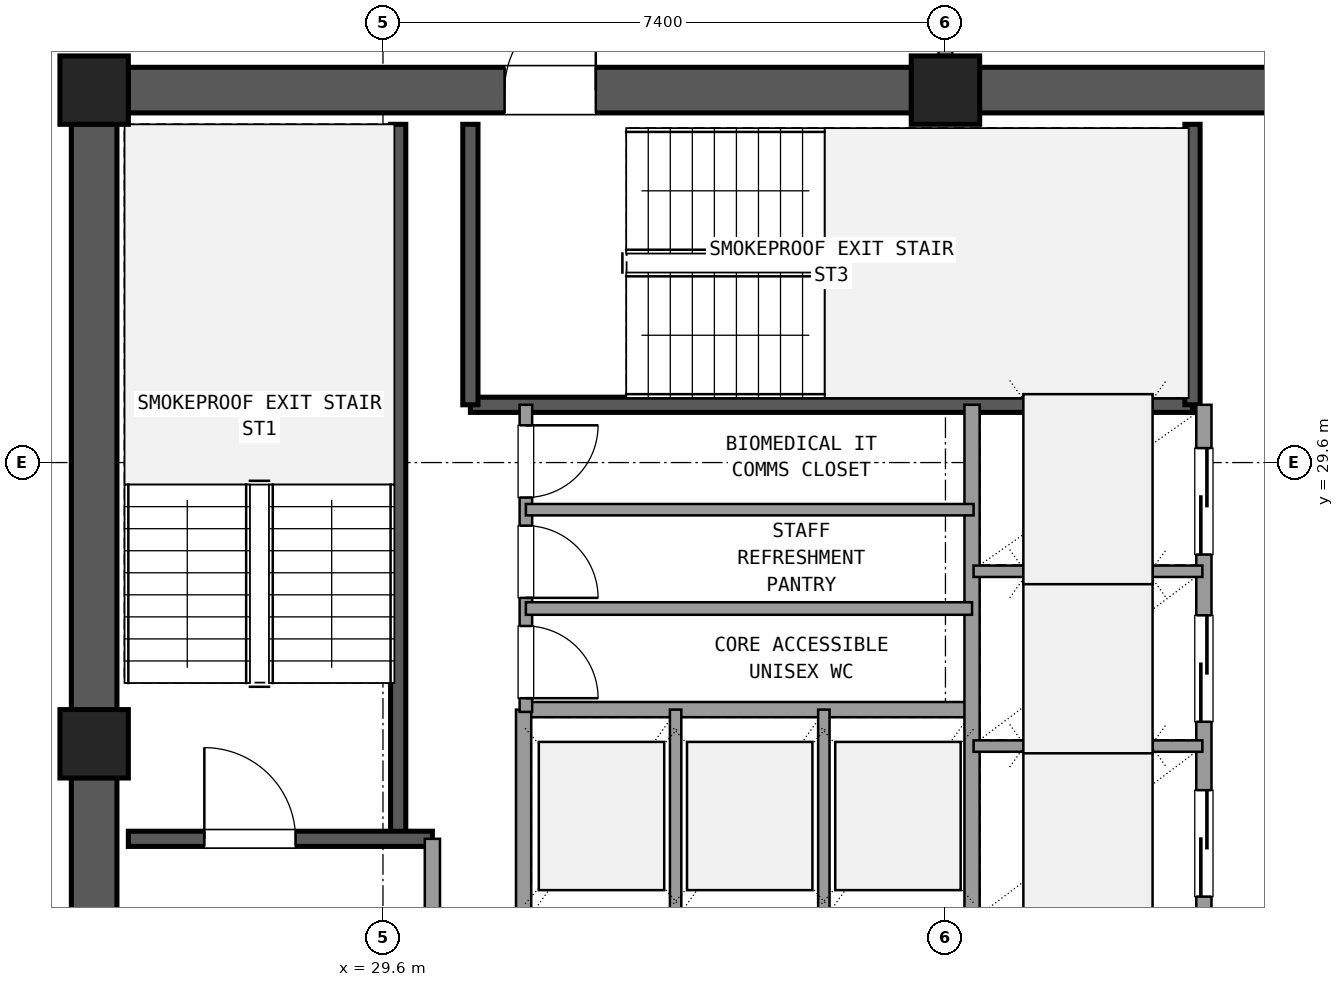
"""IFC4 building model, lengths in metres.
Left out: names, types, materials, properties, quantities, classifications, styles, units other than length and angle.
Written with IfcOpenShell. Run it as: python <this file> out.ifc"""

import sys

from ifc_helpers import new_model, si_unit, direction, frame, frame_2d, origin, origin_2d, place, context, subcontext, project, spatial, rectangle, extrude, element, fill, save


model = new_model("IFC4")
c1 = context("Model", 3, precision=1e-05, world=origin(), true_north=direction((0.0, 1.0)))
c2 = subcontext(c1, "Body", "Model", "MODEL_VIEW")
j1 = project(units=[si_unit("LENGTHUNIT", "METRE"), si_unit("PLANEANGLEUNIT", "RADIAN")], contexts=[c1])
p1 = place(None, origin())
s1 = spatial("IfcSite", under=j1, at=p1, CompositionType="ELEMENT")
p2 = place(p1, origin())
s2 = spatial("IfcBuilding", under=s1, at=p2, CompositionType="ELEMENT")
p3 = place(p2, frame((0.0, 0.0, 210.78)))
s3 = spatial("IfcBuildingStorey", under=s2, at=p3, CompositionType="ELEMENT", Elevation=210.78)
for number, where, z_axis, x_axis in (
    (1, (37.0, 34.5, 0.0), (0.0, 0.0, 1.0), (1.0, 0.0, 0.0)),
    (2, (25.8, 34.5, 0.0), (0.0, 0.0, 1.0), (1.0, 0.0, 0.0)),
    (3, (25.8, 25.9, 0.0), (0.0, 0.0, 1.0), (1.0, 0.0, 0.0)),
):
    element("IfcColumn", number, at=place(p3, frame(where, z_axis=z_axis, x_axis=x_axis)), inside=s3, PredefinedType="COLUMN", context=c2, shape_type="SweptSolid", body=[
        extrude(rectangle(XDim=0.9, YDim=0.9, at=origin_2d()), origin(), (0.0, 0.0, 1.0), 3.6),
    ])
p4 = place(p3, frame((47.755, 34.5, 0.0), z_axis=(0.0, 0.0, 1.0), x_axis=(-1.0, 0.0, 0.0)))
e4 = element("IfcWall", 4, at=p4, inside=s3, PredefinedType="SHEAR", context=c2, shape_type="SweptSolid", body=[
    extrude(rectangle(XDim=10.31, YDim=0.6, at=frame_2d((5.155, 0.0))), origin(), (0.0, 0.0, 1.0), 3.32),
])
p5 = place(p4, frame((4.655, 0.0, 0.0)))
e5 = element("IfcOpeningElement", 5, at=p5, cuts=e4, PredefinedType="OPENING", context=c2, shape_type="SweptSolid", body=[
    extrude(rectangle(XDim=1.6, YDim=2.2, at=frame_2d((0.8, 1.1))), frame((0.0, 0.31, 0.0), z_axis=(0.0, -1.0, 0.0), x_axis=(1.0, 0.0, 0.0)), (0.0, 0.0, 1.0), 0.62),
])
p6 = place(p3, frame((36.555, 34.5, 0.0), z_axis=(0.0, 0.0, 1.0), x_axis=(-1.0, 0.0, 0.0)))
e6 = element("IfcWall", 6, at=p6, inside=s3, PredefinedType="SHEAR", context=c2, shape_type="SweptSolid", body=[
    extrude(rectangle(XDim=10.31, YDim=0.6, at=frame_2d((5.155, 0.0))), origin(), (0.0, 0.0, 1.0), 3.32),
])
p7 = place(p6, frame((4.155, 0.0, 0.0)))
e7 = element("IfcOpeningElement", 7, at=p7, cuts=e6, PredefinedType="OPENING", context=c2, shape_type="SweptSolid", body=[
    extrude(rectangle(XDim=1.2, YDim=2.15, at=frame_2d((0.6, 1.075))), frame((0.0, 0.31, 0.0), z_axis=(0.0, -1.0, 0.0), x_axis=(1.0, 0.0, 0.0)), (0.0, 0.0, 1.0), 0.62),
])
p8 = place(p3, frame((25.8, 34.055, 0.0), z_axis=(0.0, 0.0, 1.0), x_axis=(0.0, -1.0, 0.0)))
e8 = element("IfcWall", 8, at=p8, inside=s3, PredefinedType="SHEAR", context=c2, shape_type="SweptSolid", body=[
    extrude(rectangle(XDim=7.71, YDim=0.6, at=frame_2d((3.855, 0.0))), origin(), (0.0, 0.0, 1.0), 3.32),
])
p9 = place(p3, frame((25.8, 25.455, 0.0), z_axis=(0.0, 0.0, 1.0), x_axis=(0.0, -1.0, 0.0)))
e9 = element("IfcWall", 9, at=p9, inside=s3, PredefinedType="SHEAR", context=c2, shape_type="SweptSolid", body=[
    extrude(rectangle(XDim=7.71, YDim=0.6, at=frame_2d((3.855, 0.0))), origin(), (0.0, 0.0, 1.0), 3.32),
])
p10 = place(p9, frame((2.205, 0.0, 0.0)))
e10 = element("IfcOpeningElement", 10, at=p10, cuts=e9, PredefinedType="OPENING", context=c2, shape_type="SweptSolid", body=[
    extrude(rectangle(XDim=1.2, YDim=2.15, at=frame_2d((0.6, 1.075))), frame((0.0, 0.31, 0.0), z_axis=(0.0, -1.0, 0.0), x_axis=(1.0, 0.0, 0.0)), (0.0, 0.0, 1.0), 0.62),
])
p11 = place(p3, frame((29.8, 24.65, 0.0), z_axis=(0.0, 0.0, 1.0), x_axis=(0.0, 1.0, 0.0)))
e11 = element("IfcWall", 11, at=p11, inside=s3, PredefinedType="SHEAR", context=c2, shape_type="SweptSolid", body=[
    extrude(rectangle(XDim=9.4, YDim=0.2, at=frame_2d((4.7, 0.0))), origin(), (0.0, 0.0, 1.0), 3.32),
])
p12 = place(p3, frame((26.25, 24.65, 0.0), z_axis=(0.0, 0.0, 1.0), x_axis=(1.0, 0.0, 0.0)))
e12 = element("IfcWall", 12, at=p12, inside=s3, PredefinedType="SHEAR", context=c2, shape_type="SweptSolid", body=[
    extrude(rectangle(XDim=4.0, YDim=0.2, at=frame_2d((2.0, 0.0))), origin(), (0.0, 0.0, 1.0), 3.32),
])
p13 = place(p12, frame((1.0, 0.0, 0.0)))
e13 = element("IfcOpeningElement", 13, at=p13, cuts=e12, PredefinedType="OPENING", context=c2, shape_type="SweptSolid", body=[
    extrude(rectangle(XDim=1.2, YDim=2.15, at=frame_2d((0.6, 1.075))), frame((0.0, 0.11, 0.0), z_axis=(0.0, -1.0, 0.0), x_axis=(1.0, 0.0, 0.0)), (0.0, 0.0, 1.0), 0.22),
])
p14 = place(p3, frame((30.75, 30.36, 0.0), z_axis=(0.0, 0.0, 1.0), x_axis=(1.0, 0.0, 0.0)))
e14 = element("IfcWall", 14, at=p14, inside=s3, PredefinedType="SHEAR", context=c2, shape_type="SweptSolid", body=[
    extrude(rectangle(XDim=9.5, YDim=0.2, at=frame_2d((4.75, 0.0))), origin(), (0.0, 0.0, 1.0), 3.32),
])
for number, where, z_axis, x_axis in (
    (15, (30.75, 30.36, 0.0), (0.0, 0.0, 1.0), (0.0, 1.0, 0.0)),
    (16, (40.25, 30.36, 0.0), (0.0, 0.0, 1.0), (0.0, 1.0, 0.0)),
):
    element("IfcWall", number, at=place(p3, frame(where, z_axis=z_axis, x_axis=x_axis)), inside=s3, PredefinedType="SHEAR", context=c2, shape_type="SweptSolid", body=[
        extrude(rectangle(XDim=3.69, YDim=0.2, at=frame_2d((1.845, 0.0))), origin(), (0.0, 0.0, 1.0), 3.32),
    ])
p15 = place(p3, frame((30.25, 17.75, 0.0), z_axis=(0.0, 0.0, 1.0), x_axis=(0.0, 1.0, 0.0)))
e17 = element("IfcWall", 17, at=p15, inside=s3, PredefinedType="SOLIDWALL", context=c2, shape_type="SweptSolid", body=[
    extrude(rectangle(XDim=6.9, YDim=0.2, at=frame_2d((3.45, 0.0))), origin(), (0.0, 0.0, 1.0), 2.61),
])
p16 = place(p15, frame((4.15, 0.0, 0.0)))
e18 = element("IfcOpeningElement", 18, at=p16, cuts=e17, PredefinedType="OPENING", context=c2, shape_type="SweptSolid", body=[
    extrude(rectangle(XDim=1.2, YDim=2.15, at=frame_2d((0.6, 1.075))), frame((0.0, 0.11, 0.0), z_axis=(0.0, -1.0, 0.0), x_axis=(1.0, 0.0, 0.0)), (0.0, 0.0, 1.0), 0.22),
])
p17 = place(p3, frame((31.45, 26.35, 0.0), z_axis=(0.0, 0.0, 1.0), x_axis=(1.0, 0.0, 0.0)))
e19 = element("IfcWall", 19, at=p17, inside=s3, PredefinedType="SOLIDWALL", context=c2, shape_type="SweptSolid", body=[
    extrude(rectangle(XDim=5.9, YDim=0.2, at=frame_2d((2.95, 0.0))), origin(), (0.0, 0.0, 1.0), 2.61),
])
p18 = place(p3, frame((31.45, 23.54, 0.0), z_axis=(0.0, 0.0, 1.0), x_axis=(0.0, 1.0, 0.0)))
e20 = element("IfcWall", 20, at=p18, inside=s3, PredefinedType="SOLIDWALL", context=c2, shape_type="SweptSolid", body=[
    extrude(rectangle(XDim=2.81, YDim=0.2, at=frame_2d((1.405, 0.0))), origin(), (0.0, 0.0, 1.0), 2.61),
])
for number, where, z_axis, x_axis in (
    (21, (33.45, 23.54, 0.0), (0.0, 0.0, 1.0), (0.0, 1.0, 0.0)),
    (22, (35.4, 23.54, 0.0), (0.0, 0.0, 1.0), (0.0, 1.0, 0.0)),
):
    element("IfcWall", number, at=place(p3, frame(where, z_axis=z_axis, x_axis=x_axis)), inside=s3, PredefinedType="PARTITIONING", context=c2, shape_type="SweptSolid", body=[
        extrude(rectangle(XDim=2.81, YDim=0.15, at=frame_2d((1.405, 0.0))), origin(), (0.0, 0.0, 1.0), 2.61),
    ])
p19 = place(p3, frame((37.35, 23.54, 0.0), z_axis=(0.0, 0.0, 1.0), x_axis=(0.0, 1.0, 0.0)))
e23 = element("IfcWall", 23, at=p19, inside=s3, PredefinedType="SOLIDWALL", context=c2, shape_type="SweptSolid", body=[
    extrude(rectangle(XDim=6.82, YDim=0.2, at=frame_2d((3.41, 0.0))), origin(), (0.0, 0.0, 1.0), 2.61),
])
p20 = place(p3, frame((40.4, 23.54, 0.0), z_axis=(0.0, 0.0, 1.0), x_axis=(0.0, 1.0, 0.0)))
e24 = element("IfcWall", 24, at=p20, inside=s3, PredefinedType="SOLIDWALL", context=c2, shape_type="SweptSolid", body=[
    extrude(rectangle(XDim=6.82, YDim=0.2, at=frame_2d((3.41, 0.0))), origin(), (0.0, 0.0, 1.0), 2.61),
])
p21 = place(p20, frame((0.35, 0.0, 0.0)))
e25 = element("IfcOpeningElement", 25, at=p21, cuts=e24, PredefinedType="OPENING", context=c2, shape_type="SweptSolid", body=[
    extrude(rectangle(XDim=1.4, YDim=2.2, at=frame_2d((0.7, 1.1))), frame((0.0, 0.11, 0.0), z_axis=(0.0, -1.0, 0.0), x_axis=(1.0, 0.0, 0.0)), (0.0, 0.0, 1.0), 0.22),
])
p22 = place(p20, frame((2.65, 0.0, 0.0)))
e26 = element("IfcOpeningElement", 26, at=p22, cuts=e24, PredefinedType="OPENING", context=c2, shape_type="SweptSolid", body=[
    extrude(rectangle(XDim=1.4, YDim=2.2, at=frame_2d((0.7, 1.1))), frame((0.0, 0.11, 0.0), z_axis=(0.0, -1.0, 0.0), x_axis=(1.0, 0.0, 0.0)), (0.0, 0.0, 1.0), 0.22),
])
p23 = place(p20, frame((4.85, 0.0, 0.0)))
e27 = element("IfcOpeningElement", 27, at=p23, cuts=e24, PredefinedType="OPENING", context=c2, shape_type="SweptSolid", body=[
    extrude(rectangle(XDim=1.4, YDim=2.2, at=frame_2d((0.7, 1.1))), frame((0.0, 0.11, 0.0), z_axis=(0.0, -1.0, 0.0), x_axis=(1.0, 0.0, 0.0)), (0.0, 0.0, 1.0), 0.22),
])
for number, where, z_axis, x_axis in (
    (28, (37.37, 25.87, 0.0), (0.0, 0.0, 1.0), (1.0, 0.0, 0.0)),
    (29, (37.37, 28.17, 0.0), (0.0, 0.0, 1.0), (1.0, 0.0, 0.0)),
):
    element("IfcWall", number, at=place(p3, frame(where, z_axis=z_axis, x_axis=x_axis)), inside=s3, PredefinedType="PARTITIONING", context=c2, shape_type="SweptSolid", body=[
        extrude(rectangle(XDim=3.01, YDim=0.15, at=frame_2d((1.505, 0.0))), origin(), (0.0, 0.0, 1.0), 2.61),
    ])
p24 = place(p3, frame((31.48, 26.32, 0.0), z_axis=(0.0, 0.0, 1.0), x_axis=(0.0, 1.0, 0.0)))
e30 = element("IfcWall", 30, at=p24, inside=s3, PredefinedType="PLUMBINGWALL", context=c2, shape_type="SweptSolid", body=[
    extrude(rectangle(XDim=4.04, YDim=0.165, at=frame_2d((2.02, 0.0))), origin(), (0.0, 0.0, 1.0), 2.61),
])
p25 = place(p24, frame((0.18, 0.0, 0.0)))
e31 = element("IfcOpeningElement", 31, at=p25, cuts=e30, PredefinedType="OPENING", context=c2, shape_type="SweptSolid", body=[
    extrude(rectangle(XDim=0.95, YDim=2.1, at=frame_2d((0.475, 1.05))), frame((0.0, 0.093, 0.0), z_axis=(0.0, -1.0, 0.0), x_axis=(1.0, 0.0, 0.0)), (0.0, 0.0, 1.0), 0.185),
])
p26 = place(p24, frame((1.5, 0.0, 0.0)))
e32 = element("IfcOpeningElement", 32, at=p26, cuts=e30, PredefinedType="OPENING", context=c2, shape_type="SweptSolid", body=[
    extrude(rectangle(XDim=0.95, YDim=2.1, at=frame_2d((0.475, 1.05))), frame((0.0, 0.093, 0.0), z_axis=(0.0, -1.0, 0.0), x_axis=(1.0, 0.0, 0.0)), (0.0, 0.0, 1.0), 0.185),
])
p27 = place(p24, frame((2.82, 0.0, 0.0)))
e33 = element("IfcOpeningElement", 33, at=p27, cuts=e30, PredefinedType="OPENING", context=c2, shape_type="SweptSolid", body=[
    extrude(rectangle(XDim=0.95, YDim=2.1, at=frame_2d((0.475, 1.05))), frame((0.0, 0.093, 0.0), z_axis=(0.0, -1.0, 0.0), x_axis=(1.0, 0.0, 0.0)), (0.0, 0.0, 1.0), 0.185),
])
p28 = place(p3, frame((31.48, 27.68, 0.0), z_axis=(0.0, 0.0, 1.0), x_axis=(1.0, 0.0, 0.0)))
e34 = element("IfcWall", 34, at=p28, inside=s3, PredefinedType="PLUMBINGWALL", context=c2, shape_type="SweptSolid", body=[
    extrude(rectangle(XDim=5.87, YDim=0.165, at=frame_2d((2.935, 0.0))), origin(), (0.0, 0.0, 1.0), 2.61),
])
p29 = place(p3, frame((31.48, 28.98, 0.0), z_axis=(0.0, 0.0, 1.0), x_axis=(1.0, 0.0, 0.0)))
e35 = element("IfcWall", 35, at=p29, inside=s3, PredefinedType="PARTITIONING", context=c2, shape_type="SweptSolid", body=[
    extrude(rectangle(XDim=5.89, YDim=0.15, at=frame_2d((2.945, 0.0))), origin(), (0.0, 0.0, 1.0), 2.61),
])
p30 = place(p3, frame((37.0, 34.95, 0.0), z_axis=(0.0, 0.0, 1.0), x_axis=(0.0, 1.0, 0.0)))
e36 = element("IfcWall", 36, at=p30, inside=s3, PredefinedType="PARTITIONING", context=c2, shape_type="SweptSolid", body=[
    extrude(rectangle(XDim=2.7, YDim=0.18, at=frame_2d((1.35, 0.0))), origin(), (0.0, 0.0, 1.0), 2.61),
])
p31 = place(p30, frame((0.35, 0.0, 0.0)))
e37 = element("IfcOpeningElement", 37, at=p31, cuts=e36, PredefinedType="OPENING", context=c2, shape_type="SweptSolid", body=[
    extrude(rectangle(XDim=2.0, YDim=2.2, at=frame_2d((1.0, 1.1))), frame((0.0, 0.1, 0.0), z_axis=(0.0, -1.0, 0.0), x_axis=(1.0, 0.0, 0.0)), (0.0, 0.0, 1.0), 0.2),
])
p32 = place(p13, origin())
e38 = element("IfcDoor", 38, at=p32, inside=s3, OperationType="SINGLE_SWING_LEFT", PredefinedType="DOOR", context=c2, shape_type="SweptSolid", body=[
    extrude(rectangle(XDim=1.2, YDim=2.15, at=frame_2d((0.6, 1.075))), frame((0.0, 0.025, 0.0), z_axis=(0.0, -1.0, 0.0), x_axis=(1.0, 0.0, 0.0)), (0.0, 0.0, 1.0), 0.05),
])
fill(e13, e38)
p33 = place(p7, frame((1.2, 0.0, 0.0), z_axis=(0.0, 0.0, 1.0), x_axis=(-1.0, 0.0, 0.0)))
e39 = element("IfcDoor", 39, at=p33, inside=s3, OperationType="SINGLE_SWING_LEFT", PredefinedType="DOOR", context=c2, shape_type="SweptSolid", body=[
    extrude(rectangle(XDim=1.2, YDim=2.15, at=frame_2d((0.6, 1.075))), frame((0.0, 0.025, 0.0), z_axis=(0.0, -1.0, 0.0), x_axis=(1.0, 0.0, 0.0)), (0.0, 0.0, 1.0), 0.05),
])
fill(e7, e39)
p34 = place(p21, origin())
e40 = element("IfcDoor", 40, at=p34, inside=s3, OperationType="SLIDING_TO_LEFT", PredefinedType="DOOR", context=c2, shape_type="SweptSolid", body=[
    extrude(rectangle(XDim=1.4, YDim=2.2, at=frame_2d((0.7, 1.1))), frame((0.0, 0.025, 0.0), z_axis=(0.0, -1.0, 0.0), x_axis=(1.0, 0.0, 0.0)), (0.0, 0.0, 1.0), 0.05),
])
fill(e25, e40)
p35 = place(p22, origin())
e41 = element("IfcDoor", 41, at=p35, inside=s3, OperationType="SLIDING_TO_LEFT", PredefinedType="DOOR", context=c2, shape_type="SweptSolid", body=[
    extrude(rectangle(XDim=1.4, YDim=2.2, at=frame_2d((0.7, 1.1))), frame((0.0, 0.025, 0.0), z_axis=(0.0, -1.0, 0.0), x_axis=(1.0, 0.0, 0.0)), (0.0, 0.0, 1.0), 0.05),
])
fill(e26, e41)
p36 = place(p23, origin())
e42 = element("IfcDoor", 42, at=p36, inside=s3, OperationType="SLIDING_TO_RIGHT", PredefinedType="DOOR", context=c2, shape_type="SweptSolid", body=[
    extrude(rectangle(XDim=1.4, YDim=2.2, at=frame_2d((0.7, 1.1))), frame((0.0, 0.025, 0.0), z_axis=(0.0, -1.0, 0.0), x_axis=(1.0, 0.0, 0.0)), (0.0, 0.0, 1.0), 0.05),
])
fill(e27, e42)
p37 = place(p25, frame((0.95, 0.0, 0.0), z_axis=(0.0, 0.0, 1.0), x_axis=(-1.0, 0.0, 0.0)))
e43 = element("IfcDoor", 43, at=p37, inside=s3, OperationType="SINGLE_SWING_LEFT", PredefinedType="DOOR", context=c2, shape_type="SweptSolid", body=[
    extrude(rectangle(XDim=0.95, YDim=2.1, at=frame_2d((0.475, 1.05))), frame((0.0, 0.025, 0.0), z_axis=(0.0, -1.0, 0.0), x_axis=(1.0, 0.0, 0.0)), (0.0, 0.0, 1.0), 0.05),
])
fill(e31, e43)
p38 = place(p26, frame((0.95, 0.0, 0.0), z_axis=(0.0, 0.0, 1.0), x_axis=(-1.0, 0.0, 0.0)))
e44 = element("IfcDoor", 44, at=p38, inside=s3, OperationType="SINGLE_SWING_LEFT", PredefinedType="DOOR", context=c2, shape_type="SweptSolid", body=[
    extrude(rectangle(XDim=0.95, YDim=2.1, at=frame_2d((0.475, 1.05))), frame((0.0, 0.025, 0.0), z_axis=(0.0, -1.0, 0.0), x_axis=(1.0, 0.0, 0.0)), (0.0, 0.0, 1.0), 0.05),
])
fill(e32, e44)
p39 = place(p27, frame((0.95, 0.0, 0.0), z_axis=(0.0, 0.0, 1.0), x_axis=(-1.0, 0.0, 0.0)))
e45 = element("IfcDoor", 45, at=p39, inside=s3, OperationType="SINGLE_SWING_RIGHT", PredefinedType="DOOR", context=c2, shape_type="SweptSolid", body=[
    extrude(rectangle(XDim=0.95, YDim=2.1, at=frame_2d((0.475, 1.05))), frame((0.0, 0.025, 0.0), z_axis=(0.0, -1.0, 0.0), x_axis=(1.0, 0.0, 0.0)), (0.0, 0.0, 1.0), 0.05),
])
fill(e33, e45)
save(model, sys.argv[1])
